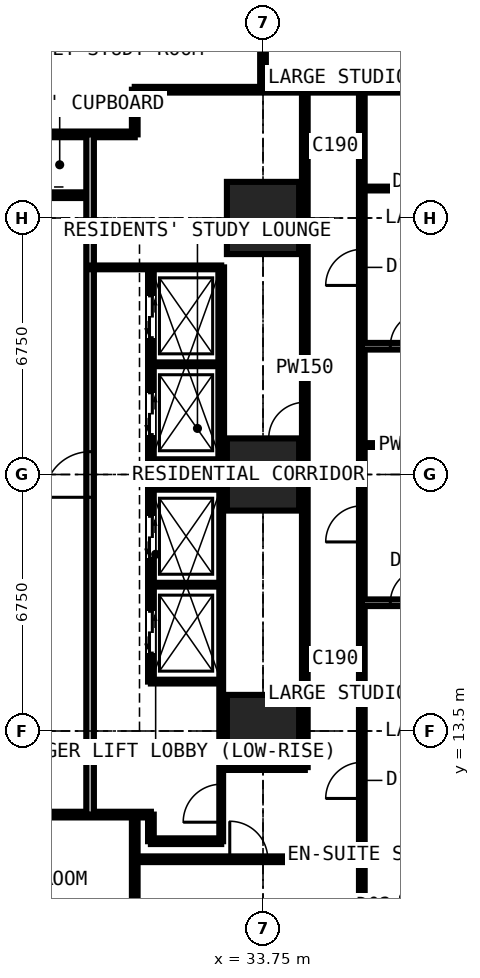
"""IFC4 building model, lengths in metres.
Left out: names, types, materials, properties, quantities, classifications, styles, units other than length and angle.
Written with IfcOpenShell. Run it as: python <this file> out.ifc"""

import sys

from ifc_helpers import new_model, si_unit, direction, frame, frame_2d, origin, origin_2d, place, context, subcontext, project, spatial, rectangle, extrude, element, fill, save


model = new_model("IFC4")
c1 = context("Model", 3, precision=1e-05, world=origin(), true_north=direction((0.0, 1.0)))
c2 = subcontext(c1, "Body", "Model", "MODEL_VIEW")
j1 = project(units=[si_unit("LENGTHUNIT", "METRE"), si_unit("PLANEANGLEUNIT", "RADIAN")], contexts=[c1])
p1 = place(None, origin())
s1 = spatial("IfcSite", under=j1, at=p1, CompositionType="ELEMENT")
p2 = place(p1, origin())
s2 = spatial("IfcBuilding", under=s1, at=p2, CompositionType="ELEMENT")
p3 = place(p2, frame((0.0, 0.0, 43.2)))
s3 = spatial("IfcBuildingStorey", under=s2, at=p3, CompositionType="ELEMENT", Elevation=43.2)
for number, where, z_axis, x_axis in (
    (1, (33.75, 13.5, 0.0), (0.0, 0.0, 1.0), (1.0, 0.0, 0.0)),
    (2, (33.75, 20.25, 0.0), (0.0, 0.0, 1.0), (1.0, 0.0, 0.0)),
    (3, (33.75, 27.0, 0.0), (0.0, 0.0, 1.0), (1.0, 0.0, 0.0)),
):
    element("IfcColumn", number, at=place(p3, frame(where, z_axis=z_axis, x_axis=x_axis)), inside=s3, PredefinedType="COLUMN", context=c2, shape_type="SweptSolid", body=[
        extrude(rectangle(XDim=1.9, YDim=1.9, at=origin_2d()), origin(), (0.0, 0.0, 1.0), 3.6),
    ])
p4 = place(p3, frame((10.125, 11.3, 0.0), z_axis=(0.0, 0.0, 1.0), x_axis=(1.0, 0.0, 0.0)))
e4 = element("IfcWall", 4, at=p4, inside=s3, PredefinedType="PARTITIONING", context=c2, shape_type="SweptSolid", body=[
    extrude(rectangle(XDim=20.675, YDim=0.15, at=frame_2d((10.337, 0.0))), origin(), (0.0, 0.0, 1.0), 3.375),
])
p5 = place(p4, frame((8.375, 0.0, 0.0)))
e5 = element("IfcOpeningElement", 5, at=p5, cuts=e4, PredefinedType="OPENING", context=c2, shape_type="SweptSolid", body=[
    extrude(rectangle(XDim=1.0, YDim=2.2, at=frame_2d((0.5, 1.1))), frame((0.0, 0.085, 0.0), z_axis=(0.0, -1.0, 0.0), x_axis=(1.0, 0.0, 0.0)), (0.0, 0.0, 1.0), 0.17),
])
p6 = place(p4, frame((10.975, 0.0, 0.0)))
e6 = element("IfcOpeningElement", 6, at=p6, cuts=e4, PredefinedType="OPENING", context=c2, shape_type="SweptSolid", body=[
    extrude(rectangle(XDim=1.0, YDim=2.2, at=frame_2d((0.5, 1.1))), frame((0.0, 0.085, 0.0), z_axis=(0.0, -1.0, 0.0), x_axis=(1.0, 0.0, 0.0)), (0.0, 0.0, 1.0), 0.17),
])
p7 = place(p4, frame((3.925, 0.0, 0.0)))
e7 = element("IfcOpeningElement", 7, at=p7, cuts=e4, PredefinedType="OPENING", context=c2, shape_type="SweptSolid", body=[
    extrude(rectangle(XDim=0.95, YDim=2.2, at=frame_2d((0.475, 1.1))), frame((0.0, 0.085, 0.0), z_axis=(0.0, -1.0, 0.0), x_axis=(1.0, 0.0, 0.0)), (0.0, 0.0, 1.0), 0.17),
])
p8 = place(p3, frame((11.3, 29.2, 0.0), z_axis=(0.0, 0.0, 1.0), x_axis=(1.0, 0.0, 0.0)))
e8 = element("IfcWall", 8, at=p8, inside=s3, PredefinedType="PARTITIONING", context=c2, shape_type="SweptSolid", body=[
    extrude(rectangle(XDim=19.075, YDim=0.15, at=frame_2d((9.538, 0.0))), origin(), (0.0, 0.0, 1.0), 3.375),
])
p9 = place(p8, frame((12.875, 0.0, 0.0)))
e9 = element("IfcOpeningElement", 9, at=p9, cuts=e8, PredefinedType="OPENING", context=c2, shape_type="SweptSolid", body=[
    extrude(rectangle(XDim=1.0, YDim=2.2, at=frame_2d((0.5, 1.1))), frame((0.0, 0.085, 0.0), z_axis=(0.0, -1.0, 0.0), x_axis=(1.0, 0.0, 0.0)), (0.0, 0.0, 1.0), 0.17),
])
p10 = place(p8, frame((10.438, 0.0, 0.0)))
e10 = element("IfcOpeningElement", 10, at=p10, cuts=e8, PredefinedType="OPENING", context=c2, shape_type="SweptSolid", body=[
    extrude(rectangle(XDim=1.0, YDim=2.2, at=frame_2d((0.5, 1.1))), frame((0.0, 0.085, 0.0), z_axis=(0.0, -1.0, 0.0), x_axis=(1.0, 0.0, 0.0)), (0.0, 0.0, 1.0), 0.17),
])
p11 = place(p8, frame((14.875, 0.0, 0.0)))
e11 = element("IfcOpeningElement", 11, at=p11, cuts=e8, PredefinedType="OPENING", context=c2, shape_type="SweptSolid", body=[
    extrude(rectangle(XDim=0.95, YDim=2.2, at=frame_2d((0.475, 1.1))), frame((0.0, 0.085, 0.0), z_axis=(0.0, -1.0, 0.0), x_axis=(1.0, 0.0, 0.0)), (0.0, 0.0, 1.0), 0.17),
])
p12 = place(p3, frame((27.6, 27.6, 0.0), z_axis=(0.0, 0.0, 1.0), x_axis=(1.0, 0.0, 0.0)))
e12 = element("IfcWall", 12, at=p12, inside=s3, PredefinedType="PARTITIONING", context=c2, shape_type="SweptSolid", body=[
    extrude(rectangle(XDim=1.6, YDim=0.15, at=frame_2d((0.8, 0.0))), origin(), (0.0, 0.0, 1.0), 2.877),
])
p13 = place(p3, frame((29.2, 11.3, 0.0), z_axis=(0.0, 0.0, 1.0), x_axis=(0.0, 1.0, 0.0)))
e13 = element("IfcWall", 13, at=p13, inside=s3, PredefinedType="PARTITIONING", context=c2, shape_type="SweptSolid", body=[
    extrude(rectangle(XDim=17.9, YDim=0.2, at=frame_2d((8.95, 0.0))), origin(), (0.0, 0.0, 1.0), 3.375),
])
p14 = place(p13, frame((8.35, 0.0, 0.0)))
e14 = element("IfcOpeningElement", 14, at=p14, cuts=e13, PredefinedType="OPENING", context=c2, shape_type="SweptSolid", body=[
    extrude(rectangle(XDim=1.2, YDim=2.2, at=frame_2d((0.6, 1.1))), frame((0.0, 0.11, 0.0), z_axis=(0.0, -1.0, 0.0), x_axis=(1.0, 0.0, 0.0)), (0.0, 0.0, 1.0), 0.22),
])
p15 = place(p3, frame((29.2, 25.7, 0.0), z_axis=(0.0, 0.0, 1.0), x_axis=(1.0, 0.0, 0.0)))
e15 = element("IfcWall", 15, at=p15, inside=s3, PredefinedType="SHEAR", context=c2, shape_type="SweptSolid", body=[
    extrude(rectangle(XDim=3.45, YDim=0.1, at=frame_2d((1.725, 0.0))), origin(), (0.0, 0.0, 1.0), 3.375),
])
p16 = place(p3, frame((30.375, -0.734, 0.0), z_axis=(0.0, 0.0, 1.0), x_axis=(0.0, 1.0, 0.0)))
e16 = element("IfcWall", 16, at=p16, inside=s3, PredefinedType="PARTITIONING", context=c2, shape_type="SweptSolid", body=[
    extrude(rectangle(XDim=12.034, YDim=0.15, at=frame_2d((6.017, 0.0))), origin(), (0.0, 0.0, 1.0), 3.375),
])
p17 = place(p3, frame((30.375, 10.125, 0.0), z_axis=(0.0, 0.0, 1.0), x_axis=(1.0, 0.0, 0.0)))
e17 = element("IfcWall", 17, at=p17, inside=s3, PredefinedType="PARTITIONING", context=c2, shape_type="SweptSolid", body=[
    extrude(rectangle(XDim=10.859, YDim=0.15, at=frame_2d((5.429, 0.0))), origin(), (0.0, 0.0, 1.0), 3.375),
])
p18 = place(p17, frame((2.5, 0.0, 0.0)))
e18 = element("IfcOpeningElement", 18, at=p18, cuts=e17, PredefinedType="OPENING", context=c2, shape_type="SweptSolid", body=[
    extrude(rectangle(XDim=1.0, YDim=2.2, at=frame_2d((0.5, 1.1))), frame((0.0, 0.085, 0.0), z_axis=(0.0, -1.0, 0.0), x_axis=(1.0, 0.0, 0.0)), (0.0, 0.0, 1.0), 0.17),
])
p19 = place(p3, frame((30.375, 29.2, 0.0), z_axis=(0.0, 0.0, 1.0), x_axis=(0.0, 1.0, 0.0)))
e19 = element("IfcWall", 19, at=p19, inside=s3, PredefinedType="PARTITIONING", context=c2, shape_type="SweptSolid", body=[
    extrude(rectangle(XDim=1.175, YDim=0.15, at=frame_2d((0.587, 0.0))), origin(), (0.0, 0.0, 1.0), 3.375),
])
p20 = place(p3, frame((30.375, 30.375, 0.0), z_axis=(0.0, 0.0, 1.0), x_axis=(1.0, 0.0, 0.0)))
e20 = element("IfcWall", 20, at=p20, inside=s3, PredefinedType="PARTITIONING", context=c2, shape_type="SweptSolid", body=[
    extrude(rectangle(XDim=10.859, YDim=0.15, at=frame_2d((5.429, 0.0))), origin(), (0.0, 0.0, 1.0), 3.375),
])
p21 = place(p3, frame((30.8, 10.6, 0.0), z_axis=(0.0, 0.0, 1.0), x_axis=(0.0, 1.0, 0.0)))
e21 = element("IfcWall", 21, at=p21, inside=s3, PredefinedType="PARTITIONING", context=c2, shape_type="SweptSolid", body=[
    extrude(rectangle(XDim=0.7, YDim=0.15, at=frame_2d((0.35, 0.0))), origin(), (0.0, 0.0, 1.0), 3.375),
])
p22 = place(p3, frame((30.8, 10.6, 0.0), z_axis=(0.0, 0.0, 1.0), x_axis=(1.0, 0.0, 0.0)))
e22 = element("IfcWall", 22, at=p22, inside=s3, PredefinedType="PARTITIONING", context=c2, shape_type="SweptSolid", body=[
    extrude(rectangle(XDim=1.85, YDim=0.15, at=frame_2d((0.925, 0.0))), origin(), (0.0, 0.0, 1.0), 3.375),
])
p23 = place(p3, frame((30.8, 14.8, 0.0), z_axis=(0.0, 0.0, 1.0), x_axis=(0.0, 1.0, 0.0)))
e23 = element("IfcWall", 23, at=p23, inside=s3, PredefinedType="PARTITIONING", context=c2, shape_type="SweptSolid", body=[
    extrude(rectangle(XDim=10.9, YDim=0.15, at=frame_2d((5.45, 0.0))), origin(), (0.0, 0.0, 1.0), 3.375),
])
p24 = place(p23, frame((0.75, 0.0, 0.0)))
e24 = element("IfcOpeningElement", 24, at=p24, cuts=e23, PredefinedType="OPENING", context=c2, shape_type="SweptSolid", body=[
    extrude(rectangle(XDim=1.1, YDim=2.2, at=frame_2d((0.55, 1.1))), frame((0.0, 0.085, 0.0), z_axis=(0.0, -1.0, 0.0), x_axis=(1.0, 0.0, 0.0)), (0.0, 0.0, 1.0), 0.17),
])
p25 = place(p23, frame((3.25, 0.0, 0.0)))
e25 = element("IfcOpeningElement", 25, at=p25, cuts=e23, PredefinedType="OPENING", context=c2, shape_type="SweptSolid", body=[
    extrude(rectangle(XDim=1.1, YDim=2.2, at=frame_2d((0.55, 1.1))), frame((0.0, 0.085, 0.0), z_axis=(0.0, -1.0, 0.0), x_axis=(1.0, 0.0, 0.0)), (0.0, 0.0, 1.0), 0.17),
])
p26 = place(p23, frame((6.5, 0.0, 0.0)))
e26 = element("IfcOpeningElement", 26, at=p26, cuts=e23, PredefinedType="OPENING", context=c2, shape_type="SweptSolid", body=[
    extrude(rectangle(XDim=1.1, YDim=2.2, at=frame_2d((0.55, 1.1))), frame((0.0, 0.085, 0.0), z_axis=(0.0, -1.0, 0.0), x_axis=(1.0, 0.0, 0.0)), (0.0, 0.0, 1.0), 0.17),
])
p27 = place(p23, frame((9.05, 0.0, 0.0)))
e27 = element("IfcOpeningElement", 27, at=p27, cuts=e23, PredefinedType="OPENING", context=c2, shape_type="SweptSolid", body=[
    extrude(rectangle(XDim=1.1, YDim=2.2, at=frame_2d((0.55, 1.1))), frame((0.0, 0.085, 0.0), z_axis=(0.0, -1.0, 0.0), x_axis=(1.0, 0.0, 0.0)), (0.0, 0.0, 1.0), 0.17),
])
for number, where, z_axis, x_axis in (
    (28, (30.8, 14.8, 0.0), (0.0, 0.0, 1.0), (1.0, 0.0, 0.0)),
    (29, (30.8, 17.35, 0.0), (0.0, 0.0, 1.0), (1.0, 0.0, 0.0)),
    (30, (30.8, 19.9, 0.0), (0.0, 0.0, 1.0), (1.0, 0.0, 0.0)),
    (31, (30.8, 20.6, 0.0), (0.0, 0.0, 1.0), (1.0, 0.0, 0.0)),
    (32, (30.8, 23.15, 0.0), (0.0, 0.0, 1.0), (1.0, 0.0, 0.0)),
):
    element("IfcWall", number, at=place(p3, frame(where, z_axis=z_axis, x_axis=x_axis)), inside=s3, PredefinedType="SHEAR", context=c2, shape_type="SweptSolid", body=[
        extrude(rectangle(XDim=1.85, YDim=0.1, at=frame_2d((0.925, 0.0))), origin(), (0.0, 0.0, 1.0), 3.375),
    ])
p28 = place(p3, frame((32.65, 10.6, 0.0), z_axis=(0.0, 0.0, 1.0), x_axis=(0.0, 1.0, 0.0)))
e33 = element("IfcWall", 33, at=p28, inside=s3, PredefinedType="SHEAR", context=c2, shape_type="SweptSolid", body=[
    extrude(rectangle(XDim=9.3, YDim=0.1, at=frame_2d((4.65, 0.0))), origin(), (0.0, 0.0, 1.0), 3.375),
])
p29 = place(p28, frame((0.5, 0.0, 0.0)))
e34 = element("IfcOpeningElement", 34, at=p29, cuts=e33, PredefinedType="OPENING", context=c2, shape_type="SweptSolid", body=[
    extrude(rectangle(XDim=1.0, YDim=2.2, at=frame_2d((0.5, 1.1))), frame((0.0, 0.06, 0.0), z_axis=(0.0, -1.0, 0.0), x_axis=(1.0, 0.0, 0.0)), (0.0, 0.0, 1.0), 0.12),
])
p30 = place(p3, frame((32.65, 12.55, 0.0), z_axis=(0.0, 0.0, 1.0), x_axis=(1.0, 0.0, 0.0)))
e35 = element("IfcWall", 35, at=p30, inside=s3, PredefinedType="PARTITIONING", context=c2, shape_type="SweptSolid", body=[
    extrude(rectangle(XDim=2.2, YDim=0.15, at=frame_2d((1.1, 0.0))), origin(), (0.0, 0.0, 1.0), 3.375),
])
p31 = place(p3, frame((32.65, 20.6, 0.0), z_axis=(0.0, 0.0, 1.0), x_axis=(0.0, 1.0, 0.0)))
e36 = element("IfcWall", 36, at=p31, inside=s3, PredefinedType="PARTITIONING", context=c2, shape_type="SweptSolid", body=[
    extrude(rectangle(XDim=5.1, YDim=0.15, at=frame_2d((2.55, 0.0))), origin(), (0.0, 0.0, 1.0), 3.375),
])
p32 = place(p3, frame((33.75, 30.375, 0.0), z_axis=(0.0, 0.0, 1.0), x_axis=(0.0, 1.0, 0.0)))
e37 = element("IfcWall", 37, at=p32, inside=s3, PredefinedType="PARTITIONING", context=c2, shape_type="SweptSolid", body=[
    extrude(rectangle(XDim=5.975, YDim=0.15, at=frame_2d((2.988, 0.0))), origin(), (0.0, 0.0, 1.0), 2.877),
])
p33 = place(p3, frame((34.85, 12.55, 0.0), z_axis=(0.0, 0.0, 1.0), x_axis=(0.0, 1.0, 0.0)))
e38 = element("IfcWall", 38, at=p33, inside=s3, PredefinedType="PARTITIONING", context=c2, shape_type="SweptSolid", body=[
    extrude(rectangle(XDim=17.825, YDim=0.15, at=frame_2d((8.913, 0.0))), origin(), (0.0, 0.0, 1.0), 3.375),
])
p34 = place(p33, frame((8.65, 0.0, 0.0)))
e39 = element("IfcOpeningElement", 39, at=p34, cuts=e38, PredefinedType="OPENING", context=c2, shape_type="SweptSolid", body=[
    extrude(rectangle(XDim=0.95, YDim=2.2, at=frame_2d((0.475, 1.1))), frame((0.0, 0.085, 0.0), z_axis=(0.0, -1.0, 0.0), x_axis=(1.0, 0.0, 0.0)), (0.0, 0.0, 1.0), 0.17),
])
p35 = place(p3, frame((36.35, 6.75, 0.0), z_axis=(0.0, 0.0, 1.0), x_axis=(0.0, 1.0, 0.0)))
e40 = element("IfcWall", 40, at=p35, inside=s3, PredefinedType="PARTITIONING", context=c2, shape_type="SweptSolid", body=[
    extrude(rectangle(XDim=23.625, YDim=0.15, at=frame_2d((11.812, 0.0))), origin(), (0.0, 0.0, 1.0), 3.375),
])
p36 = place(p35, frame((0.2, 0.0, 0.0)))
e41 = element("IfcOpeningElement", 41, at=p36, cuts=e40, PredefinedType="OPENING", context=c2, shape_type="SweptSolid", body=[
    extrude(rectangle(XDim=0.95, YDim=2.2, at=frame_2d((0.475, 1.1))), frame((0.0, 0.085, 0.0), z_axis=(0.0, -1.0, 0.0), x_axis=(1.0, 0.0, 0.0)), (0.0, 0.0, 1.0), 0.17),
])
p37 = place(p35, frame((18.475, 0.0, 0.0)))
e42 = element("IfcOpeningElement", 42, at=p37, cuts=e40, PredefinedType="OPENING", context=c2, shape_type="SweptSolid", body=[
    extrude(rectangle(XDim=0.95, YDim=2.2, at=frame_2d((0.475, 1.1))), frame((0.0, 0.085, 0.0), z_axis=(0.0, -1.0, 0.0), x_axis=(1.0, 0.0, 0.0)), (0.0, 0.0, 1.0), 0.17),
])
p38 = place(p35, frame((11.725, 0.0, 0.0)))
e43 = element("IfcOpeningElement", 43, at=p38, cuts=e40, PredefinedType="OPENING", context=c2, shape_type="SweptSolid", body=[
    extrude(rectangle(XDim=0.95, YDim=2.2, at=frame_2d((0.475, 1.1))), frame((0.0, 0.085, 0.0), z_axis=(0.0, -1.0, 0.0), x_axis=(1.0, 0.0, 0.0)), (0.0, 0.0, 1.0), 0.17),
])
p39 = place(p35, frame((4.975, 0.0, 0.0)))
e44 = element("IfcOpeningElement", 44, at=p39, cuts=e40, PredefinedType="OPENING", context=c2, shape_type="SweptSolid", body=[
    extrude(rectangle(XDim=0.95, YDim=2.2, at=frame_2d((0.475, 1.1))), frame((0.0, 0.085, 0.0), z_axis=(0.0, -1.0, 0.0), x_axis=(1.0, 0.0, 0.0)), (0.0, 0.0, 1.0), 0.17),
])
p40 = place(p3, frame((36.35, 14.275, 0.0), z_axis=(0.0, 0.0, 1.0), x_axis=(1.0, 0.0, 0.0)))
e45 = element("IfcWall", 45, at=p40, inside=s3, PredefinedType="PARTITIONING", context=c2, shape_type="SweptSolid", body=[
    extrude(rectangle(XDim=2.4, YDim=0.1, at=frame_2d((1.2, 0.0))), origin(), (0.0, 0.0, 1.0), 3.375),
])
p41 = place(p3, frame((36.35, 16.875, 0.0), z_axis=(0.0, 0.0, 1.0), x_axis=(1.0, 0.0, 0.0)))
e46 = element("IfcWall", 46, at=p41, inside=s3, PredefinedType="PARTITIONING", context=c2, shape_type="SweptSolid", body=[
    extrude(rectangle(XDim=4.884, YDim=0.175, at=frame_2d((2.442, 0.0))), origin(), (0.0, 0.0, 1.0), 3.375),
])
p42 = place(p41, frame((0.75, 0.0, 0.0)))
e47 = element("IfcOpeningElement", 47, at=p42, cuts=e46, PredefinedType="OPENING", context=c2, shape_type="SweptSolid", body=[
    extrude(rectangle(XDim=0.9, YDim=2.2, at=frame_2d((0.45, 1.1))), frame((0.0, 0.097, 0.0), z_axis=(0.0, -1.0, 0.0), x_axis=(1.0, 0.0, 0.0)), (0.0, 0.0, 1.0), 0.195),
])
p43 = place(p3, frame((36.35, 21.025, 0.0), z_axis=(0.0, 0.0, 1.0), x_axis=(1.0, 0.0, 0.0)))
e48 = element("IfcWall", 48, at=p43, inside=s3, PredefinedType="PARTITIONING", context=c2, shape_type="SweptSolid", body=[
    extrude(rectangle(XDim=2.4, YDim=0.1, at=frame_2d((1.2, 0.0))), origin(), (0.0, 0.0, 1.0), 3.375),
])
p44 = place(p3, frame((36.35, 23.625, 0.0), z_axis=(0.0, 0.0, 1.0), x_axis=(1.0, 0.0, 0.0)))
e49 = element("IfcWall", 49, at=p44, inside=s3, PredefinedType="PARTITIONING", context=c2, shape_type="SweptSolid", body=[
    extrude(rectangle(XDim=4.884, YDim=0.175, at=frame_2d((2.442, 0.0))), origin(), (0.0, 0.0, 1.0), 3.375),
])
p45 = place(p44, frame((0.75, 0.0, 0.0)))
e50 = element("IfcOpeningElement", 50, at=p45, cuts=e49, PredefinedType="OPENING", context=c2, shape_type="SweptSolid", body=[
    extrude(rectangle(XDim=0.9, YDim=2.2, at=frame_2d((0.45, 1.1))), frame((0.0, 0.097, 0.0), z_axis=(0.0, -1.0, 0.0), x_axis=(1.0, 0.0, 0.0)), (0.0, 0.0, 1.0), 0.195),
])
p46 = place(p3, frame((36.35, 27.775, 0.0), z_axis=(0.0, 0.0, 1.0), x_axis=(1.0, 0.0, 0.0)))
e51 = element("IfcWall", 51, at=p46, inside=s3, PredefinedType="PARTITIONING", context=c2, shape_type="SweptSolid", body=[
    extrude(rectangle(XDim=2.4, YDim=0.1, at=frame_2d((1.2, 0.0))), origin(), (0.0, 0.0, 1.0), 3.375),
])
p47 = place(p18, origin())
e52 = element("IfcDoor", 52, at=p47, inside=s3, OperationType="SINGLE_SWING_LEFT", PredefinedType="DOOR", context=c2, shape_type="SweptSolid", body=[
    extrude(rectangle(XDim=1.0, YDim=2.2, at=frame_2d((0.5, 1.1))), frame((0.0, 0.025, 0.0), z_axis=(0.0, -1.0, 0.0), x_axis=(1.0, 0.0, 0.0)), (0.0, 0.0, 1.0), 0.05),
])
fill(e18, e52)
p48 = place(p37, origin())
e53 = element("IfcDoor", 53, at=p48, inside=s3, OperationType="SINGLE_SWING_LEFT", PredefinedType="DOOR", context=c2, shape_type="SweptSolid", body=[
    extrude(rectangle(XDim=0.95, YDim=2.2, at=frame_2d((0.475, 1.1))), frame((0.0, 0.025, 0.0), z_axis=(0.0, -1.0, 0.0), x_axis=(1.0, 0.0, 0.0)), (0.0, 0.0, 1.0), 0.05),
])
fill(e42, e53)
p49 = place(p38, origin())
e54 = element("IfcDoor", 54, at=p49, inside=s3, OperationType="SINGLE_SWING_LEFT", PredefinedType="DOOR", context=c2, shape_type="SweptSolid", body=[
    extrude(rectangle(XDim=0.95, YDim=2.2, at=frame_2d((0.475, 1.1))), frame((0.0, 0.025, 0.0), z_axis=(0.0, -1.0, 0.0), x_axis=(1.0, 0.0, 0.0)), (0.0, 0.0, 1.0), 0.05),
])
fill(e43, e54)
p50 = place(p45, origin())
e55 = element("IfcDoor", 55, at=p50, inside=s3, OperationType="SINGLE_SWING_RIGHT", PredefinedType="DOOR", context=c2, shape_type="SweptSolid", body=[
    extrude(rectangle(XDim=0.9, YDim=2.2, at=frame_2d((0.45, 1.1))), frame((0.0, 0.025, 0.0), z_axis=(0.0, -1.0, 0.0), x_axis=(1.0, 0.0, 0.0)), (0.0, 0.0, 1.0), 0.05),
])
fill(e50, e55)
p51 = place(p39, origin())
e56 = element("IfcDoor", 56, at=p51, inside=s3, OperationType="SINGLE_SWING_LEFT", PredefinedType="DOOR", context=c2, shape_type="SweptSolid", body=[
    extrude(rectangle(XDim=0.95, YDim=2.2, at=frame_2d((0.475, 1.1))), frame((0.0, 0.025, 0.0), z_axis=(0.0, -1.0, 0.0), x_axis=(1.0, 0.0, 0.0)), (0.0, 0.0, 1.0), 0.05),
])
fill(e44, e56)
p52 = place(p42, origin())
e57 = element("IfcDoor", 57, at=p52, inside=s3, OperationType="SINGLE_SWING_RIGHT", PredefinedType="DOOR", context=c2, shape_type="SweptSolid", body=[
    extrude(rectangle(XDim=0.9, YDim=2.2, at=frame_2d((0.45, 1.1))), frame((0.0, 0.025, 0.0), z_axis=(0.0, -1.0, 0.0), x_axis=(1.0, 0.0, 0.0)), (0.0, 0.0, 1.0), 0.05),
])
fill(e47, e57)
p53 = place(p29, origin())
e58 = element("IfcDoor", 58, at=p53, inside=s3, OperationType="SINGLE_SWING_LEFT", PredefinedType="DOOR", context=c2, shape_type="SweptSolid", body=[
    extrude(rectangle(XDim=1.0, YDim=2.2, at=frame_2d((0.5, 1.1))), frame((0.0, 0.025, 0.0), z_axis=(0.0, -1.0, 0.0), x_axis=(1.0, 0.0, 0.0)), (0.0, 0.0, 1.0), 0.05),
])
fill(e34, e58)
p54 = place(p34, origin())
e59 = element("IfcDoor", 59, at=p54, inside=s3, OperationType="SINGLE_SWING_LEFT", PredefinedType="DOOR", context=c2, shape_type="SweptSolid", body=[
    extrude(rectangle(XDim=0.95, YDim=2.2, at=frame_2d((0.475, 1.1))), frame((0.0, 0.025, 0.0), z_axis=(0.0, -1.0, 0.0), x_axis=(1.0, 0.0, 0.0)), (0.0, 0.0, 1.0), 0.05),
])
fill(e39, e59)
p55 = place(p24, origin())
e60 = element("IfcDoor", 60, at=p55, inside=s3, OperationType="DOUBLE_DOOR_SLIDING", PredefinedType="DOOR", context=c2, shape_type="SweptSolid", body=[
    extrude(rectangle(XDim=1.1, YDim=2.2, at=frame_2d((0.55, 1.1))), frame((0.0, 0.025, 0.0), z_axis=(0.0, -1.0, 0.0), x_axis=(1.0, 0.0, 0.0)), (0.0, 0.0, 1.0), 0.05),
])
fill(e24, e60)
p56 = place(p25, origin())
e61 = element("IfcDoor", 61, at=p56, inside=s3, OperationType="DOUBLE_DOOR_SLIDING", PredefinedType="DOOR", context=c2, shape_type="SweptSolid", body=[
    extrude(rectangle(XDim=1.1, YDim=2.2, at=frame_2d((0.55, 1.1))), frame((0.0, 0.025, 0.0), z_axis=(0.0, -1.0, 0.0), x_axis=(1.0, 0.0, 0.0)), (0.0, 0.0, 1.0), 0.05),
])
fill(e25, e61)
p57 = place(p26, origin())
e62 = element("IfcDoor", 62, at=p57, inside=s3, OperationType="DOUBLE_DOOR_SLIDING", PredefinedType="DOOR", context=c2, shape_type="SweptSolid", body=[
    extrude(rectangle(XDim=1.1, YDim=2.2, at=frame_2d((0.55, 1.1))), frame((0.0, 0.025, 0.0), z_axis=(0.0, -1.0, 0.0), x_axis=(1.0, 0.0, 0.0)), (0.0, 0.0, 1.0), 0.05),
])
fill(e26, e62)
p58 = place(p27, origin())
e63 = element("IfcDoor", 63, at=p58, inside=s3, OperationType="DOUBLE_DOOR_SLIDING", PredefinedType="DOOR", context=c2, shape_type="SweptSolid", body=[
    extrude(rectangle(XDim=1.1, YDim=2.2, at=frame_2d((0.55, 1.1))), frame((0.0, 0.025, 0.0), z_axis=(0.0, -1.0, 0.0), x_axis=(1.0, 0.0, 0.0)), (0.0, 0.0, 1.0), 0.05),
])
fill(e27, e63)
p59 = place(p14, origin())
e64 = element("IfcDoor", 64, at=p59, inside=s3, OperationType="DOUBLE_DOOR_SINGLE_SWING", PredefinedType="DOOR", context=c2, shape_type="SweptSolid", body=[
    extrude(rectangle(XDim=1.2, YDim=2.2, at=frame_2d((0.6, 1.1))), frame((0.0, 0.025, 0.0), z_axis=(0.0, -1.0, 0.0), x_axis=(1.0, 0.0, 0.0)), (0.0, 0.0, 1.0), 0.05),
])
fill(e14, e64)
save(model, sys.argv[1])
